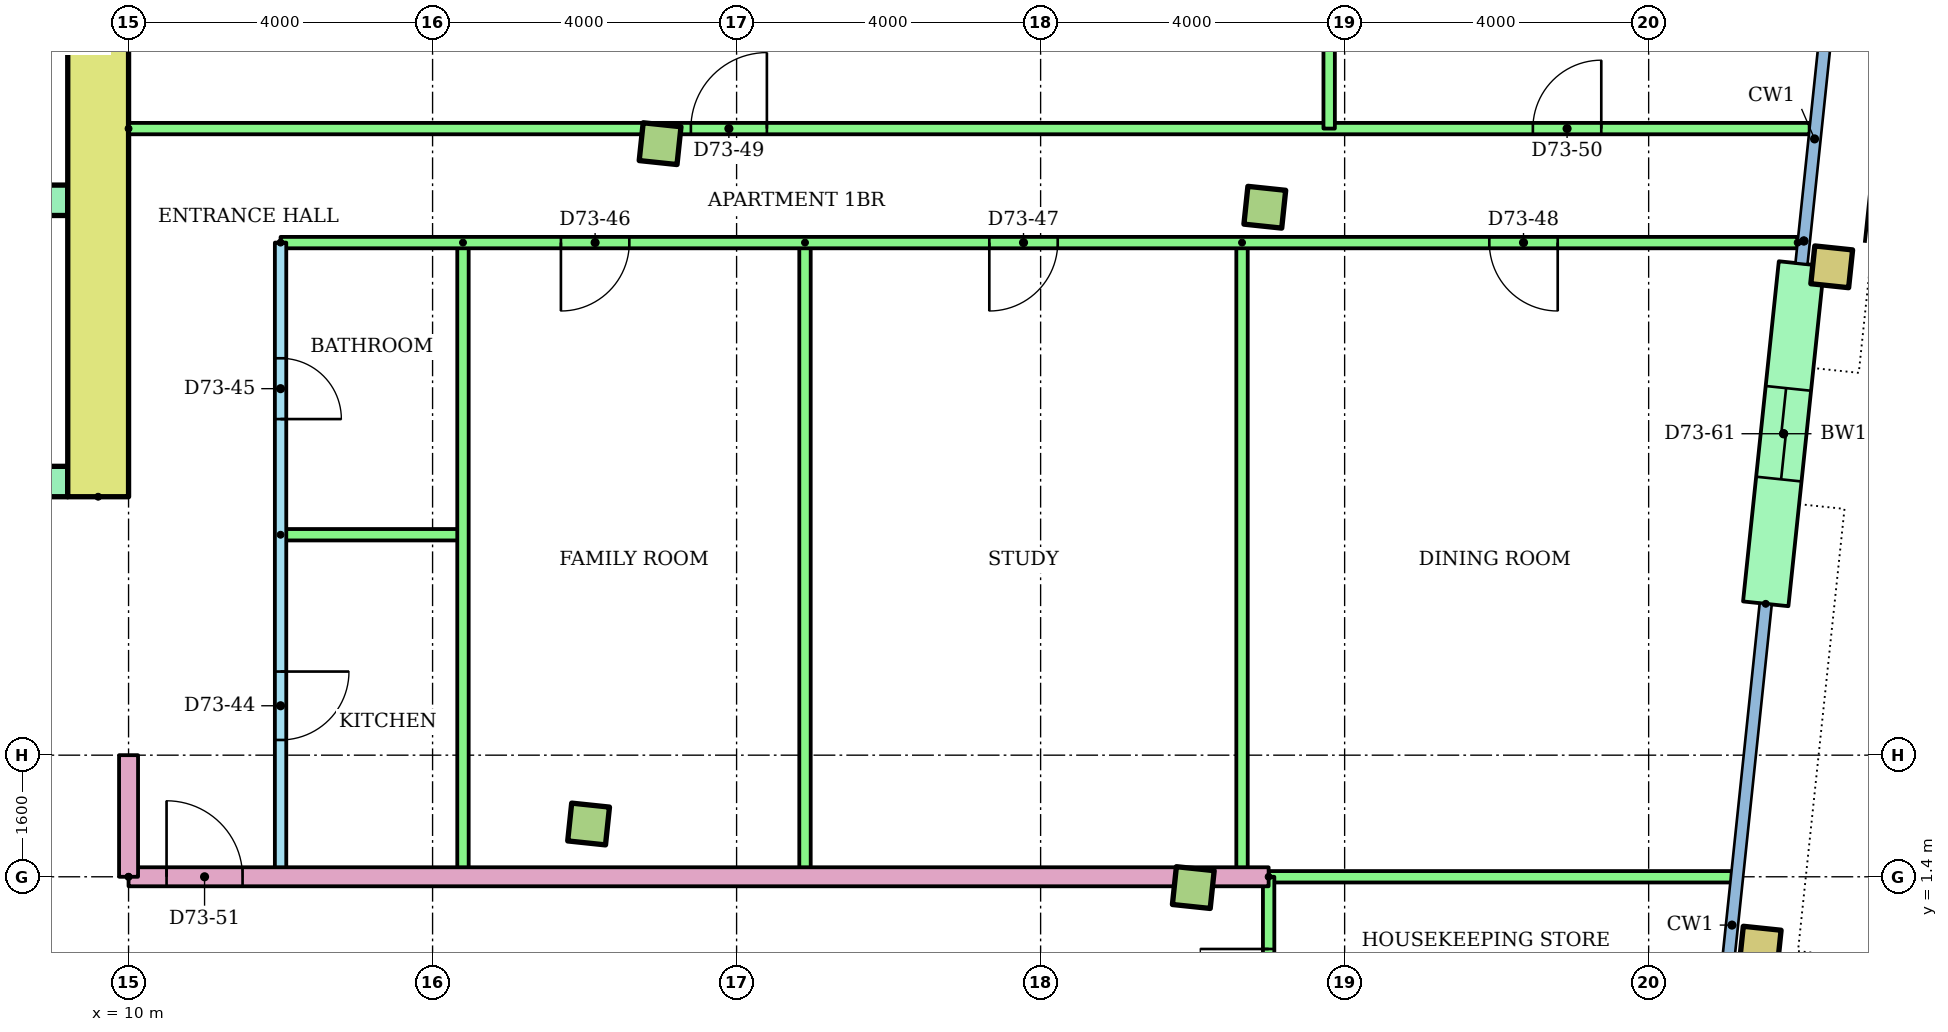
"""IFC4 building model, lengths in metres.
Left out: names, types, materials, properties, quantities, classifications, styles, units other than length and angle.
Written with IfcOpenShell. Run it as: python <this file> out.ifc"""

import sys

from ifc_helpers import new_model, si_unit, direction, frame, frame_2d, origin, origin_2d, place, context, subcontext, project, spatial, rectangle, hollow_rectangle, extrude, element, fill, save


model = new_model("IFC4")
c1 = context("Model", 3, precision=1e-05, world=origin(), true_north=direction((0.0, 1.0)))
c2 = subcontext(c1, "Body", "Model", "MODEL_VIEW")
j1 = project(units=[si_unit("LENGTHUNIT", "METRE"), si_unit("PLANEANGLEUNIT", "RADIAN")], contexts=[c1])
p1 = place(None, origin())
s1 = spatial("IfcSite", under=j1, at=p1, CompositionType="ELEMENT")
p2 = place(p1, origin())
s2 = spatial("IfcBuilding", under=s1, at=p2, CompositionType="ELEMENT")
p3 = place(p2, frame((0.0, 0.0, 278.7)))
s3 = spatial("IfcBuildingStorey", under=s2, at=p3, CompositionType="ELEMENT", Elevation=278.7)
for number, where, z_axis, x_axis in (
    (1, (16.053, 2.094, 0.0), (0.0, 0.0, 1.0), (0.995, -0.105, 0.0)),
    (2, (24.009, 1.258, 0.0), (0.0, 0.0, 1.0), (0.995, -0.105, 0.0)),
):
    element("IfcColumn", number, at=place(p3, frame(where, z_axis=z_axis, x_axis=x_axis)), inside=s3, PredefinedType="COLUMN", context=c2, shape_type="SweptSolid", body=[
        extrude(rectangle(XDim=0.5, YDim=0.5, at=origin_2d()), origin(), (0.0, 0.0, 1.0), 3.2),
    ])
p4 = place(p3, frame((31.468, 0.474, 0.0), z_axis=(0.0, 0.0, 1.0), x_axis=(0.994521895368, -0.104528463268, 0.0)))
e3 = element("IfcColumn", 3, at=p4, inside=s3, PredefinedType="COLUMN", context=c2, shape_type="SweptSolid", body=[
    extrude(hollow_rectangle(XDim=0.5, YDim=0.5, WallThickness=0.025, at=origin_2d()), origin(), (0.0, 0.0, 1.0), 3.2),
])
for number, where, z_axis, x_axis in (
    (4, (16.993, 11.045, 0.0), (0.0, 0.0, 1.0), (0.995, -0.105, 0.0)),
    (5, (24.95, 10.209, 0.0), (0.0, 0.0, 1.0), (0.995, -0.105, 0.0)),
):
    element("IfcColumn", number, at=place(p3, frame(where, z_axis=z_axis, x_axis=x_axis)), inside=s3, PredefinedType="COLUMN", context=c2, shape_type="SweptSolid", body=[
        extrude(rectangle(XDim=0.5, YDim=0.5, at=origin_2d()), origin(), (0.0, 0.0, 1.0), 3.2),
    ])
p5 = place(p3, frame((32.409, 9.425, 0.0), z_axis=(0.0, 0.0, 1.0), x_axis=(0.994521895368, -0.104528463268, 0.0)))
e6 = element("IfcColumn", 6, at=p5, inside=s3, PredefinedType="COLUMN", context=c2, shape_type="SweptSolid", body=[
    extrude(hollow_rectangle(XDim=0.5, YDim=0.5, WallThickness=0.025, at=origin_2d()), origin(), (0.0, 0.0, 1.0), 3.2),
])
p6 = place(p3, frame((31.54, 4.991, 0.0), z_axis=(0.0, 0.0, 1.0), x_axis=(0.104546400045, 0.994520009974, 0.0)))
e7 = element("IfcWall", 7, at=p6, inside=s3, PredefinedType="STANDARD", context=c2, shape_type="SweptSolid", body=[
    extrude(rectangle(XDim=4.5, YDim=0.6, at=frame_2d((2.25, 0.0))), origin(), (0.0, 0.0, 1.0), 2.8),
])
p7 = place(p6, frame((1.65, 0.0, 0.0)))
e8 = element("IfcOpeningElement", 8, at=p7, cuts=e7, PredefinedType="OPENING", context=c2, shape_type="SweptSolid", body=[
    extrude(rectangle(XDim=1.2, YDim=2.1, at=frame_2d((0.6, 1.05))), frame((0.0, 0.31, 0.0), z_axis=(0.0, -1.0, 0.0), x_axis=(1.0, 0.0, 0.0)), (0.0, 0.0, 1.0), 0.62),
])
p8 = place(p3, frame((9.6, 6.4, 0.0), z_axis=(0.0, 0.0, 1.0), x_axis=(0.0, 1.0, 0.0)))
e9 = element("IfcWall", 9, at=p8, inside=s3, PredefinedType="SHEAR", context=c2, shape_type="SweptSolid", body=[
    extrude(rectangle(XDim=13.6, YDim=0.8, at=frame_2d((6.8, 0.0))), origin(), (0.0, 0.0, 1.0), 2.8),
])
p9 = place(p3, frame((-9.2, 6.6, 0.0)))
e10 = element("IfcWall", 10, at=p9, inside=s3, PredefinedType="SHEAR", context=c2, shape_type="SweptSolid", body=[
    extrude(rectangle(XDim=18.4, YDim=0.4, at=frame_2d((9.2, 0.0))), origin(), (0.0, 0.0, 1.0), 2.8),
])
p10 = place(p9, frame((8.3, 0.0, 0.0)))
e11 = element("IfcOpeningElement", 11, at=p10, cuts=e10, PredefinedType="OPENING", context=c2, shape_type="SweptSolid", body=[
    extrude(rectangle(XDim=1.8, YDim=2.1, at=frame_2d((0.9, 1.05))), frame((0.0, 0.21, 0.0), z_axis=(0.0, -1.0, 0.0), x_axis=(1.0, 0.0, 0.0)), (0.0, 0.0, 1.0), 0.42),
])
p11 = place(p9, frame((3.8, 0.0, 0.0)))
e12 = element("IfcOpeningElement", 12, at=p11, cuts=e10, PredefinedType="OPENING", context=c2, shape_type="SweptSolid", body=[
    extrude(rectangle(XDim=1.8, YDim=2.1, at=frame_2d((0.9, 1.05))), frame((0.0, 0.21, 0.0), z_axis=(0.0, -1.0, 0.0), x_axis=(1.0, 0.0, 0.0)), (0.0, 0.0, 1.0), 0.42),
])
p12 = place(p9, frame((12.8, 0.0, 0.0)))
e13 = element("IfcOpeningElement", 13, at=p12, cuts=e10, PredefinedType="OPENING", context=c2, shape_type="SweptSolid", body=[
    extrude(rectangle(XDim=1.8, YDim=2.1, at=frame_2d((0.9, 1.05))), frame((0.0, 0.21, 0.0), z_axis=(0.0, -1.0, 0.0), x_axis=(1.0, 0.0, 0.0)), (0.0, 0.0, 1.0), 0.42),
])
p13 = place(p3, frame((1.2, 10.3, 0.0)))
e14 = element("IfcWall", 14, at=p13, inside=s3, PredefinedType="SHEAR", context=c2, shape_type="SweptSolid", body=[
    extrude(rectangle(XDim=8.0, YDim=0.4, at=frame_2d((4.0, 0.0))), origin(), (0.0, 0.0, 1.0), 2.8),
])
p14 = place(p13, frame((0.817, 0.0, 0.0)))
e15 = element("IfcOpeningElement", 15, at=p14, cuts=e14, PredefinedType="OPENING", context=c2, shape_type="SweptSolid", body=[
    extrude(rectangle(XDim=1.1, YDim=2.1, at=frame_2d((0.55, 1.05))), frame((0.0, 0.21, 0.0), z_axis=(0.0, -1.0, 0.0), x_axis=(1.0, 0.0, 0.0)), (0.0, 0.0, 1.0), 0.42),
])
p15 = place(p13, frame((3.55, 0.0, 0.0)))
e16 = element("IfcOpeningElement", 16, at=p15, cuts=e14, PredefinedType="OPENING", context=c2, shape_type="SweptSolid", body=[
    extrude(rectangle(XDim=1.1, YDim=2.1, at=frame_2d((0.55, 1.05))), frame((0.0, 0.21, 0.0), z_axis=(0.0, -1.0, 0.0), x_axis=(1.0, 0.0, 0.0)), (0.0, 0.0, 1.0), 0.42),
])
p16 = place(p13, frame((6.283, 0.0, 0.0)))
e17 = element("IfcOpeningElement", 17, at=p16, cuts=e14, PredefinedType="OPENING", context=c2, shape_type="SweptSolid", body=[
    extrude(rectangle(XDim=1.1, YDim=2.1, at=frame_2d((0.55, 1.05))), frame((0.0, 0.21, 0.0), z_axis=(0.0, -1.0, 0.0), x_axis=(1.0, 0.0, 0.0)), (0.0, 0.0, 1.0), 0.42),
])
p17 = place(p3, frame((12.0, 9.743, 0.0), z_axis=(0.0, 0.0, 1.0), x_axis=(0.0, -1.0, 0.0)))
e18 = element("IfcWall", 18, at=p17, inside=s3, PredefinedType="PARTITIONING", context=c2, shape_type="SweptSolid", body=[
    extrude(rectangle(XDim=8.344, YDim=0.15, at=frame_2d((4.172, 0.0))), origin(), (0.0, 0.0, 1.0), 2.4),
])
p18 = place(p17, frame((5.643, 0.0, 0.0)))
e19 = element("IfcOpeningElement", 19, at=p18, cuts=e18, PredefinedType="OPENING", context=c2, shape_type="SweptSolid", body=[
    extrude(rectangle(XDim=0.9, YDim=2.1, at=frame_2d((0.45, 1.05))), frame((0.0, 0.085, 0.0), z_axis=(0.0, -1.0, 0.0), x_axis=(1.0, 0.0, 0.0)), (0.0, 0.0, 1.0), 0.17),
])
p19 = place(p17, frame((1.522, 0.0, 0.0)))
e20 = element("IfcOpeningElement", 20, at=p19, cuts=e18, PredefinedType="OPENING", context=c2, shape_type="SweptSolid", body=[
    extrude(rectangle(XDim=0.8, YDim=2.1, at=frame_2d((0.4, 1.05))), frame((0.0, 0.085, 0.0), z_axis=(0.0, -1.0, 0.0), x_axis=(1.0, 0.0, 0.0)), (0.0, 0.0, 1.0), 0.17),
])
p20 = place(p3, frame((12.0, 5.9, 0.0)))
e21 = element("IfcWall", 21, at=p20, inside=s3, PredefinedType="PARTITIONING", context=c2, shape_type="SweptSolid", body=[
    extrude(rectangle(XDim=2.4, YDim=0.15, at=frame_2d((1.2, 0.0))), origin(), (0.0, 0.0, 1.0), 2.4),
])
for number, where, z_axis, x_axis in (
    (22, (14.4, 9.743, 0.0), (0.0, 0.0, 1.0), (0.0, -1.0, 0.0)),
    (23, (18.9, 9.743, 0.0), (0.0, 0.0, 1.0), (0.0, -1.0, 0.0)),
    (24, (24.65, 9.743, 0.0), (0.0, 0.0, 1.0), (0.0, -1.0, 0.0)),
):
    element("IfcWall", number, at=place(p3, frame(where, z_axis=z_axis, x_axis=x_axis)), inside=s3, PredefinedType="PARTITIONING", context=c2, shape_type="SweptSolid", body=[
        extrude(rectangle(XDim=8.344, YDim=0.15, at=frame_2d((4.172, 0.0))), origin(), (0.0, 0.0, 1.0), 2.4),
    ])
p21 = place(p3, frame((31.96, 9.743, 0.0), z_axis=(0.0, 0.0, 1.0), x_axis=(-1.0, 0.0, 0.0)))
e25 = element("IfcWall", 25, at=p21, inside=s3, PredefinedType="PARTITIONING", context=c2, shape_type="SweptSolid", body=[
    extrude(rectangle(XDim=19.96, YDim=0.15, at=frame_2d((9.98, 0.0))), origin(), (0.0, 0.0, 1.0), 2.4),
])
p22 = place(p21, frame((15.372, 0.0, 0.0)))
e26 = element("IfcOpeningElement", 26, at=p22, cuts=e25, PredefinedType="OPENING", context=c2, shape_type="SweptSolid", body=[
    extrude(rectangle(XDim=0.9, YDim=2.1, at=frame_2d((0.45, 1.05))), frame((0.0, 0.085, 0.0), z_axis=(0.0, -1.0, 0.0), x_axis=(1.0, 0.0, 0.0)), (0.0, 0.0, 1.0), 0.17),
])
p23 = place(p21, frame((9.735, 0.0, 0.0)))
e27 = element("IfcOpeningElement", 27, at=p23, cuts=e25, PredefinedType="OPENING", context=c2, shape_type="SweptSolid", body=[
    extrude(rectangle(XDim=0.9, YDim=2.1, at=frame_2d((0.45, 1.05))), frame((0.0, 0.085, 0.0), z_axis=(0.0, -1.0, 0.0), x_axis=(1.0, 0.0, 0.0)), (0.0, 0.0, 1.0), 0.17),
])
p24 = place(p21, frame((3.157, 0.0, 0.0)))
e28 = element("IfcOpeningElement", 28, at=p24, cuts=e25, PredefinedType="OPENING", context=c2, shape_type="SweptSolid", body=[
    extrude(rectangle(XDim=0.9, YDim=2.1, at=frame_2d((0.45, 1.05))), frame((0.0, 0.085, 0.0), z_axis=(0.0, -1.0, 0.0), x_axis=(1.0, 0.0, 0.0)), (0.0, 0.0, 1.0), 0.17),
])
p25 = place(p3, frame((10.0, 11.243, 0.0)))
e29 = element("IfcWall", 29, at=p25, inside=s3, PredefinedType="PARTITIONING", context=c2, shape_type="SweptSolid", body=[
    extrude(rectangle(XDim=22.118, YDim=0.15, at=frame_2d((11.059, 0.0))), origin(), (0.0, 0.0, 1.0), 2.4),
])
p26 = place(p25, frame((7.398, 0.0, 0.0)))
e30 = element("IfcOpeningElement", 30, at=p26, cuts=e29, PredefinedType="OPENING", context=c2, shape_type="SweptSolid", body=[
    extrude(rectangle(XDim=1.0, YDim=2.1, at=frame_2d((0.5, 1.05))), frame((0.0, 0.085, 0.0), z_axis=(0.0, -1.0, 0.0), x_axis=(1.0, 0.0, 0.0)), (0.0, 0.0, 1.0), 0.17),
])
p27 = place(p25, frame((18.477, 0.0, 0.0)))
e31 = element("IfcOpeningElement", 31, at=p27, cuts=e29, PredefinedType="OPENING", context=c2, shape_type="SweptSolid", body=[
    extrude(rectangle(XDim=0.9, YDim=2.1, at=frame_2d((0.45, 1.05))), frame((0.0, 0.085, 0.0), z_axis=(0.0, -1.0, 0.0), x_axis=(1.0, 0.0, 0.0)), (0.0, 0.0, 1.0), 0.17),
])
p28 = place(p3, frame((25.796, 18.185, 0.0), z_axis=(0.0, 0.0, 1.0), x_axis=(0.0, -1.0, 0.0)))
e32 = element("IfcWall", 32, at=p28, inside=s3, PredefinedType="PARTITIONING", context=c2, shape_type="SweptSolid", body=[
    extrude(rectangle(XDim=6.941, YDim=0.15, at=frame_2d((3.471, 0.0))), origin(), (0.0, 0.0, 1.0), 2.4),
])
p29 = place(p3, frame((10.0, 1.4, 0.0)))
e33 = element("IfcWall", 33, at=p29, inside=s3, PredefinedType="PARTITIONING", context=c2, shape_type="SweptSolid", body=[
    extrude(rectangle(XDim=15.0, YDim=0.25, at=frame_2d((7.5, 0.0))), origin(), (0.0, 0.0, 1.0), 2.4),
])
p30 = place(p29, frame((0.5, 0.0, 0.0)))
e34 = element("IfcOpeningElement", 34, at=p30, cuts=e33, PredefinedType="OPENING", context=c2, shape_type="SweptSolid", body=[
    extrude(rectangle(XDim=1.0, YDim=2.1, at=frame_2d((0.5, 1.05))), frame((0.0, 0.135, 0.0), z_axis=(0.0, -1.0, 0.0), x_axis=(1.0, 0.0, 0.0)), (0.0, 0.0, 1.0), 0.27),
])
p31 = place(p3, frame((25.0, 1.4, 0.0)))
e35 = element("IfcWall", 35, at=p31, inside=s3, PredefinedType="PARTITIONING", context=c2, shape_type="SweptSolid", body=[
    extrude(rectangle(XDim=6.093, YDim=0.15, at=frame_2d((3.046, 0.0))), origin(), (0.0, 0.0, 1.0), 2.4),
])
p32 = place(p3, frame((25.0, -1.4, 0.0), z_axis=(0.0, 0.0, 1.0), x_axis=(0.0, 1.0, 0.0)))
e36 = element("IfcWall", 36, at=p32, inside=s3, PredefinedType="PARTITIONING", context=c2, shape_type="SweptSolid", body=[
    extrude(rectangle(XDim=2.8, YDim=0.15, at=frame_2d((1.4, 0.0))), origin(), (0.0, 0.0, 1.0), 2.4),
])
p33 = place(p32, frame((0.95, 0.0, 0.0)))
e37 = element("IfcOpeningElement", 37, at=p33, cuts=e36, PredefinedType="OPENING", context=c2, shape_type="SweptSolid", body=[
    extrude(rectangle(XDim=0.9, YDim=2.1, at=frame_2d((0.45, 1.05))), frame((0.0, 0.085, 0.0), z_axis=(0.0, -1.0, 0.0), x_axis=(1.0, 0.0, 0.0)), (0.0, 0.0, 1.0), 0.17),
])
p34 = place(p3, frame((10.0, 1.4, 0.0), z_axis=(0.0, 0.0, 1.0), x_axis=(0.0, 1.0, 0.0)))
e38 = element("IfcWall", 38, at=p34, inside=s3, PredefinedType="PARTITIONING", context=c2, shape_type="SweptSolid", body=[
    extrude(rectangle(XDim=1.6, YDim=0.25, at=frame_2d((0.8, 0.0))), origin(), (0.0, 0.0, 1.0), 2.4),
])
p35 = place(p18, origin())
e39 = element("IfcDoor", 39, at=p35, inside=s3, OperationType="SINGLE_SWING_LEFT", PredefinedType="DOOR", context=c2, shape_type="SweptSolid", body=[
    extrude(rectangle(XDim=0.9, YDim=2.1, at=frame_2d((0.45, 1.05))), frame((0.0, 0.025, 0.0), z_axis=(0.0, -1.0, 0.0), x_axis=(1.0, 0.0, 0.0)), (0.0, 0.0, 1.0), 0.05),
])
fill(e19, e39)
p36 = place(p19, origin())
e40 = element("IfcDoor", 40, at=p36, inside=s3, OperationType="SINGLE_SWING_RIGHT", PredefinedType="DOOR", context=c2, shape_type="SweptSolid", body=[
    extrude(rectangle(XDim=0.8, YDim=2.1, at=frame_2d((0.4, 1.05))), frame((0.0, 0.025, 0.0), z_axis=(0.0, -1.0, 0.0), x_axis=(1.0, 0.0, 0.0)), (0.0, 0.0, 1.0), 0.05),
])
fill(e20, e40)
p37 = place(p22, origin())
e41 = element("IfcDoor", 41, at=p37, inside=s3, OperationType="SINGLE_SWING_RIGHT", PredefinedType="DOOR", context=c2, shape_type="SweptSolid", body=[
    extrude(rectangle(XDim=0.9, YDim=2.1, at=frame_2d((0.45, 1.05))), frame((0.0, 0.025, 0.0), z_axis=(0.0, -1.0, 0.0), x_axis=(1.0, 0.0, 0.0)), (0.0, 0.0, 1.0), 0.05),
])
fill(e26, e41)
p38 = place(p23, origin())
e42 = element("IfcDoor", 42, at=p38, inside=s3, OperationType="SINGLE_SWING_RIGHT", PredefinedType="DOOR", context=c2, shape_type="SweptSolid", body=[
    extrude(rectangle(XDim=0.9, YDim=2.1, at=frame_2d((0.45, 1.05))), frame((0.0, 0.025, 0.0), z_axis=(0.0, -1.0, 0.0), x_axis=(1.0, 0.0, 0.0)), (0.0, 0.0, 1.0), 0.05),
])
fill(e27, e42)
p39 = place(p24, origin())
e43 = element("IfcDoor", 43, at=p39, inside=s3, OperationType="SINGLE_SWING_LEFT", PredefinedType="DOOR", context=c2, shape_type="SweptSolid", body=[
    extrude(rectangle(XDim=0.9, YDim=2.1, at=frame_2d((0.45, 1.05))), frame((0.0, 0.025, 0.0), z_axis=(0.0, -1.0, 0.0), x_axis=(1.0, 0.0, 0.0)), (0.0, 0.0, 1.0), 0.05),
])
fill(e28, e43)
p40 = place(p26, origin())
e44 = element("IfcDoor", 44, at=p40, inside=s3, OperationType="SINGLE_SWING_RIGHT", PredefinedType="DOOR", context=c2, shape_type="SweptSolid", body=[
    extrude(rectangle(XDim=1.0, YDim=2.1, at=frame_2d((0.5, 1.05))), frame((0.0, 0.025, 0.0), z_axis=(0.0, -1.0, 0.0), x_axis=(1.0, 0.0, 0.0)), (0.0, 0.0, 1.0), 0.05),
])
fill(e30, e44)
p41 = place(p27, origin())
e45 = element("IfcDoor", 45, at=p41, inside=s3, OperationType="SINGLE_SWING_RIGHT", PredefinedType="DOOR", context=c2, shape_type="SweptSolid", body=[
    extrude(rectangle(XDim=0.9, YDim=2.1, at=frame_2d((0.45, 1.05))), frame((0.0, 0.025, 0.0), z_axis=(0.0, -1.0, 0.0), x_axis=(1.0, 0.0, 0.0)), (0.0, 0.0, 1.0), 0.05),
])
fill(e31, e45)
p42 = place(p30, origin())
e46 = element("IfcDoor", 46, at=p42, inside=s3, OperationType="SINGLE_SWING_LEFT", PredefinedType="DOOR", context=c2, shape_type="SweptSolid", body=[
    extrude(rectangle(XDim=1.0, YDim=2.1, at=frame_2d((0.5, 1.05))), frame((0.0, 0.025, 0.0), z_axis=(0.0, -1.0, 0.0), x_axis=(1.0, 0.0, 0.0)), (0.0, 0.0, 1.0), 0.05),
])
fill(e34, e46)
p43 = place(p33, origin())
e47 = element("IfcDoor", 47, at=p43, inside=s3, OperationType="SINGLE_SWING_RIGHT", PredefinedType="DOOR", context=c2, shape_type="SweptSolid", body=[
    extrude(rectangle(XDim=0.9, YDim=2.1, at=frame_2d((0.45, 1.05))), frame((0.0, 0.025, 0.0), z_axis=(0.0, -1.0, 0.0), x_axis=(1.0, 0.0, 0.0)), (0.0, 0.0, 1.0), 0.05),
])
fill(e37, e47)
p44 = place(p7, origin())
e48 = element("IfcDoor", 48, at=p44, inside=s3, OperationType="SLIDING_TO_LEFT", PredefinedType="DOOR", context=c2, shape_type="SweptSolid", body=[
    extrude(rectangle(XDim=1.2, YDim=2.1, at=frame_2d((0.6, 1.05))), frame((0.0, 0.025, 0.0), z_axis=(0.0, -1.0, 0.0), x_axis=(1.0, 0.0, 0.0)), (0.0, 0.0, 1.0), 0.05),
])
fill(e8, e48)
save(model, sys.argv[1])
